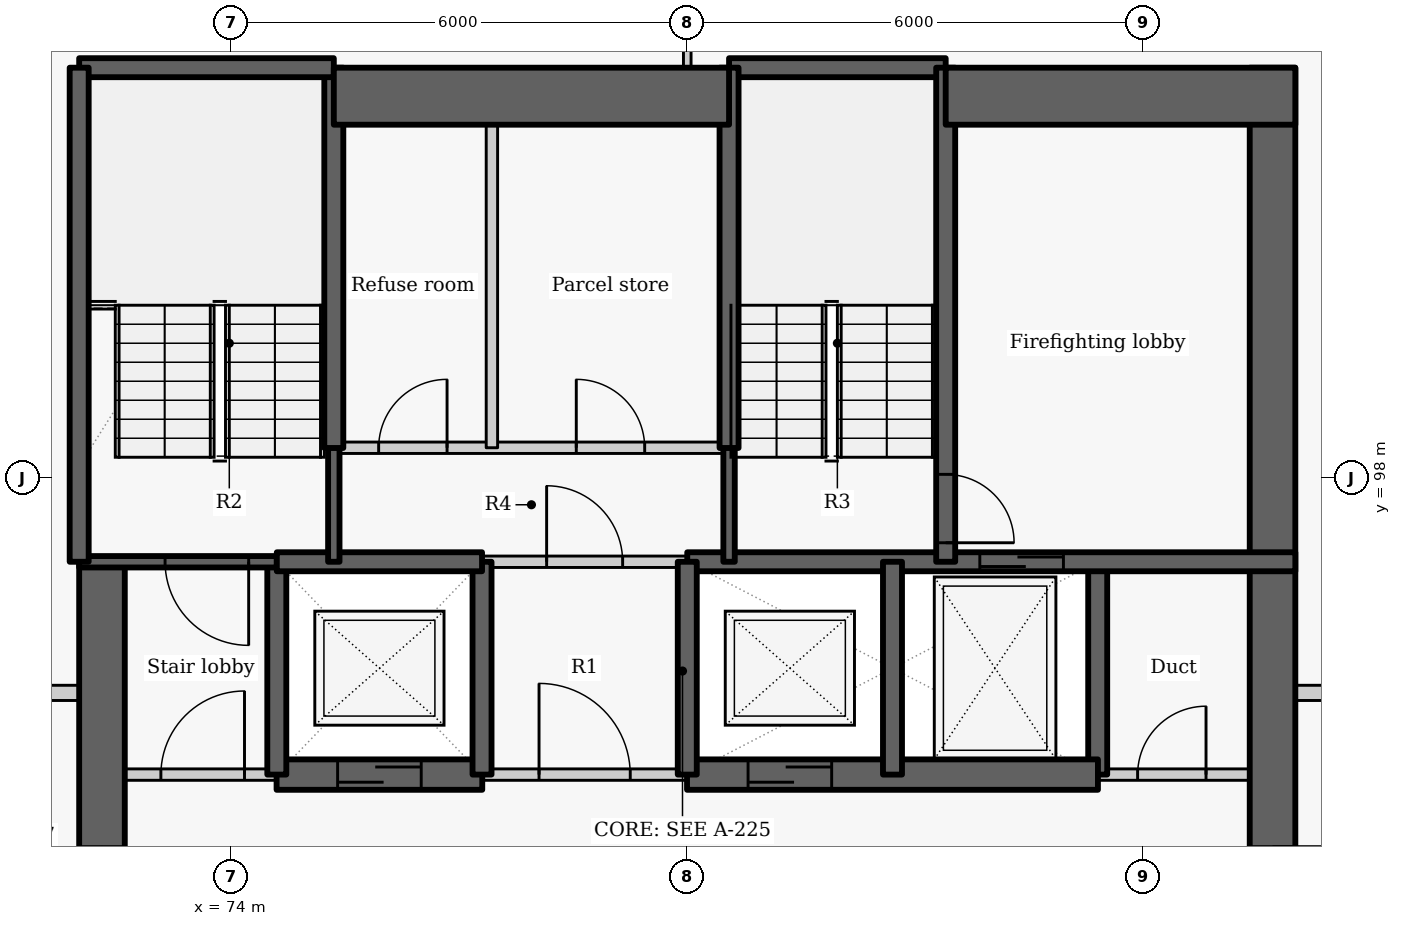
"""IFC4 building model, lengths in metres.
Left out: names, types, materials, properties, quantities, classifications, styles, units other than length and angle.
Written with IfcOpenShell. Run it as: python <this file> out.ifc"""

import sys

from ifc_helpers import new_model, si_unit, direction, frame, frame_2d, origin, place, context, subcontext, project, spatial, rectangle, extrude, element, fill, save


model = new_model("IFC4")
c1 = context("Model", 3, precision=1e-05, world=origin(), true_north=direction((0.0, 1.0)))
c2 = subcontext(c1, "Body", "Model", "MODEL_VIEW")
j1 = project(units=[si_unit("LENGTHUNIT", "METRE"), si_unit("PLANEANGLEUNIT", "RADIAN")], contexts=[c1])
p1 = place(None, origin())
s1 = spatial("IfcSite", under=j1, at=p1, CompositionType="ELEMENT")
p2 = place(p1, origin())
s2 = spatial("IfcBuilding", under=s1, at=p2, CompositionType="ELEMENT")
p3 = place(p2, frame((0.0, 0.0, 130.5)))
s3 = spatial("IfcBuildingStorey", under=s2, at=p3, CompositionType="ELEMENT", Elevation=130.5)
p4 = place(p3, frame((72.3, 87.8, -0.275), z_axis=(0.0, 0.0, 1.0), x_axis=(0.0, 1.0, 0.0)))
e1 = element("IfcWall", 1, at=p4, inside=s3, PredefinedType="SHEAR", context=c2, shape_type="SweptSolid", body=[
    extrude(rectangle(XDim=9.1, YDim=0.6, at=frame_2d((4.55, 0.0))), origin(), (0.0, 0.0, 1.0), 3.3),
])
p5 = place(p4, frame((3.852, 0.0, 0.275)))
e2 = element("IfcOpeningElement", 2, at=p5, cuts=e1, PredefinedType="OPENING", context=c2, shape_type="SweptSolid", body=[
    extrude(rectangle(XDim=1.5, YDim=2.1, at=frame_2d((0.75, 1.05))), frame((0.0, 0.31, 0.0), z_axis=(0.0, -1.0, 0.0), x_axis=(1.0, 0.0, 0.0)), (0.0, 0.0, 1.0), 0.62),
])
p6 = place(p3, frame((85.4, 94.1, -0.275), z_axis=(0.0, 0.0, 1.0), x_axis=(0.0, 1.0, 0.0)))
e3 = element("IfcWall", 3, at=p6, inside=s3, PredefinedType="SHEAR", context=c2, shape_type="SweptSolid", body=[
    extrude(rectangle(XDim=2.8, YDim=0.25, at=frame_2d((1.4, 0.0))), origin(), (0.0, 0.0, 1.0), 3.3),
])
p7 = place(p3, frame((87.7, 103.4, -0.275), z_axis=(0.0, 0.0, 1.0), x_axis=(0.0, -1.0, 0.0)))
e4 = element("IfcWall", 4, at=p7, inside=s3, PredefinedType="SHEAR", context=c2, shape_type="SweptSolid", body=[
    extrude(rectangle(XDim=15.6, YDim=0.6, at=frame_2d((7.8, 0.0))), origin(), (0.0, 0.0, 1.0), 3.3),
])
p8 = place(p7, frame((10.248, 0.0, 0.275)))
e5 = element("IfcOpeningElement", 5, at=p8, cuts=e4, PredefinedType="OPENING", context=c2, shape_type="SweptSolid", body=[
    extrude(rectangle(XDim=1.5, YDim=2.1, at=frame_2d((0.75, 1.05))), frame((0.0, 0.31, 0.0), z_axis=(0.0, -1.0, 0.0), x_axis=(1.0, 0.0, 0.0)), (0.0, 0.0, 1.0), 0.62),
])
p9 = place(p3, frame((72.0, 94.1, 0.0), z_axis=(0.0, 0.0, 1.0), x_axis=(1.0, 0.0, 0.0)))
e6 = element("IfcWall", 6, at=p9, inside=s3, PredefinedType="PARTITIONING", context=c2, shape_type="SweptSolid", body=[
    extrude(rectangle(XDim=2.603, YDim=0.15, at=frame_2d((1.302, 0.0))), origin(), (0.0, 0.0, 1.0), 3.025),
])
p10 = place(p9, frame((1.075, 0.0, 0.0)))
e7 = element("IfcOpeningElement", 7, at=p10, cuts=e6, PredefinedType="OPENING", context=c2, shape_type="SweptSolid", body=[
    extrude(rectangle(XDim=1.1, YDim=2.1, at=frame_2d((0.55, 1.05))), frame((0.0, 0.085, 0.0), z_axis=(0.0, -1.0, 0.0), x_axis=(1.0, 0.0, 0.0)), (0.0, 0.0, 1.0), 0.17),
])
p11 = place(p3, frame((77.297, 94.1, 0.0), z_axis=(0.0, 0.0, 1.0), x_axis=(1.0, 0.0, 0.0)))
e8 = element("IfcWall", 8, at=p11, inside=s3, PredefinedType="PARTITIONING", context=c2, shape_type="SweptSolid", body=[
    extrude(rectangle(XDim=2.706, YDim=0.15, at=frame_2d((1.353, 0.0))), origin(), (0.0, 0.0, 1.0), 3.025),
])
p12 = place(p11, frame((0.753, 0.0, 0.0)))
e9 = element("IfcOpeningElement", 9, at=p12, cuts=e8, PredefinedType="OPENING", context=c2, shape_type="SweptSolid", body=[
    extrude(rectangle(XDim=1.2, YDim=2.1, at=frame_2d((0.6, 1.05))), frame((0.0, 0.085, 0.0), z_axis=(0.0, -1.0, 0.0), x_axis=(1.0, 0.0, 0.0)), (0.0, 0.0, 1.0), 0.17),
])
p13 = place(p3, frame((85.397, 94.1, 0.0), z_axis=(0.0, 0.0, 1.0), x_axis=(1.0, 0.0, 0.0)))
e10 = element("IfcWall", 10, at=p13, inside=s3, PredefinedType="PARTITIONING", context=c2, shape_type="SweptSolid", body=[
    extrude(rectangle(XDim=2.603, YDim=0.15, at=frame_2d((1.302, 0.0))), origin(), (0.0, 0.0, 1.0), 3.025),
])
p14 = place(p13, frame((0.528, 0.0, 0.0)))
e11 = element("IfcOpeningElement", 11, at=p14, cuts=e10, PredefinedType="OPENING", context=c2, shape_type="SweptSolid", body=[
    extrude(rectangle(XDim=0.9, YDim=2.1, at=frame_2d((0.45, 1.05))), frame((0.0, 0.085, 0.0), z_axis=(0.0, -1.0, 0.0), x_axis=(1.0, 0.0, 0.0)), (0.0, 0.0, 1.0), 0.17),
])
p15 = place(p3, frame((74.597, 94.1, -0.275), z_axis=(0.0, 0.0, 1.0), x_axis=(1.0, 0.0, 0.0)))
e12 = element("IfcWall", 12, at=p15, inside=s3, PredefinedType="SHEAR", context=c2, shape_type="SweptSolid", body=[
    extrude(rectangle(XDim=2.706, YDim=0.4, at=frame_2d((1.353, 0.0))), origin(), (0.0, 0.0, 1.0), 3.3),
])
p16 = place(p15, frame((0.803, 0.0, 0.275)))
e13 = element("IfcOpeningElement", 13, at=p16, cuts=e12, PredefinedType="OPENING", context=c2, shape_type="SweptSolid", body=[
    extrude(rectangle(XDim=1.1, YDim=2.1, at=frame_2d((0.55, 1.05))), frame((0.0, 0.21, 0.0), z_axis=(0.0, -1.0, 0.0), x_axis=(1.0, 0.0, 0.0)), (0.0, 0.0, 1.0), 0.42),
])
p17 = place(p3, frame((79.997, 94.1, -0.275), z_axis=(0.0, 0.0, 1.0), x_axis=(1.0, 0.0, 0.0)))
e14 = element("IfcWall", 14, at=p17, inside=s3, PredefinedType="SHEAR", context=c2, shape_type="SweptSolid", body=[
    extrude(rectangle(XDim=5.406, YDim=0.4, at=frame_2d((2.703, 0.0))), origin(), (0.0, 0.0, 1.0), 3.3),
])
p18 = place(p17, frame((0.803, 0.0, 0.275)))
e15 = element("IfcOpeningElement", 15, at=p18, cuts=e14, PredefinedType="OPENING", context=c2, shape_type="SweptSolid", body=[
    extrude(rectangle(XDim=1.1, YDim=2.1, at=frame_2d((0.55, 1.05))), frame((0.0, 0.21, 0.0), z_axis=(0.0, -1.0, 0.0), x_axis=(1.0, 0.0, 0.0)), (0.0, 0.0, 1.0), 0.42),
])
p19 = place(p3, frame((74.6, 94.1, -0.275), z_axis=(0.0, 0.0, 1.0), x_axis=(0.0, 1.0, 0.0)))
e16 = element("IfcWall", 16, at=p19, inside=s3, PredefinedType="SHEAR", context=c2, shape_type="SweptSolid", body=[
    extrude(rectangle(XDim=2.8, YDim=0.25, at=frame_2d((1.4, 0.0))), origin(), (0.0, 0.0, 1.0), 3.3),
])
p20 = place(p3, frame((74.6, 96.9, -0.275), z_axis=(0.0, 0.0, 1.0), x_axis=(-1.0, 0.0, 0.0)))
e17 = element("IfcWall", 17, at=p20, inside=s3, PredefinedType="SHEAR", context=c2, shape_type="SweptSolid", body=[
    extrude(rectangle(XDim=2.6, YDim=0.15, at=frame_2d((1.3, 0.0))), origin(), (0.0, 0.0, 1.0), 3.3),
])
p21 = place(p20, frame((0.37, 0.0, 0.275)))
e18 = element("IfcOpeningElement", 18, at=p21, cuts=e17, PredefinedType="OPENING", context=c2, shape_type="SweptSolid", body=[
    extrude(rectangle(XDim=1.1, YDim=2.1, at=frame_2d((0.55, 1.05))), frame((0.0, 0.085, 0.0), z_axis=(0.0, -1.0, 0.0), x_axis=(1.0, 0.0, 0.0)), (0.0, 0.0, 1.0), 0.17),
])
p22 = place(p3, frame((77.3, 94.1, -0.275), z_axis=(0.0, 0.0, 1.0), x_axis=(0.0, 1.0, 0.0)))
e19 = element("IfcWall", 19, at=p22, inside=s3, PredefinedType="SHEAR", context=c2, shape_type="SweptSolid", body=[
    extrude(rectangle(XDim=2.8, YDim=0.25, at=frame_2d((1.4, 0.0))), origin(), (0.0, 0.0, 1.0), 3.3),
])
p23 = place(p3, frame((74.6, 96.9, -0.275), z_axis=(0.0, 0.0, 1.0), x_axis=(1.0, 0.0, 0.0)))
e20 = element("IfcWall", 20, at=p23, inside=s3, PredefinedType="SHEAR", context=c2, shape_type="SweptSolid", body=[
    extrude(rectangle(XDim=2.7, YDim=0.25, at=frame_2d((1.35, 0.0))), origin(), (0.0, 0.0, 1.0), 3.3),
])
p24 = place(p3, frame((80.0, 96.9, -0.275), z_axis=(0.0, 0.0, 1.0), x_axis=(1.0, 0.0, 0.0)))
e21 = element("IfcWall", 21, at=p24, inside=s3, PredefinedType="SHEAR", context=c2, shape_type="SweptSolid", body=[
    extrude(rectangle(XDim=8.0, YDim=0.25, at=frame_2d((4.0, 0.0))), origin(), (0.0, 0.0, 1.0), 3.3),
])
p25 = place(p24, frame((3.849, 0.0, 0.275)))
e22 = element("IfcOpeningElement", 22, at=p25, cuts=e21, PredefinedType="OPENING", context=c2, shape_type="SweptSolid", body=[
    extrude(rectangle(XDim=1.1, YDim=2.1, at=frame_2d((0.55, 1.05))), frame((0.0, 0.135, 0.0), z_axis=(0.0, -1.0, 0.0), x_axis=(1.0, 0.0, 0.0)), (0.0, 0.0, 1.0), 0.27),
])
p26 = place(p3, frame((80.0, 94.1, -0.275), z_axis=(0.0, 0.0, 1.0), x_axis=(0.0, 1.0, 0.0)))
e23 = element("IfcWall", 23, at=p26, inside=s3, PredefinedType="SHEAR", context=c2, shape_type="SweptSolid", body=[
    extrude(rectangle(XDim=2.8, YDim=0.25, at=frame_2d((1.4, 0.0))), origin(), (0.0, 0.0, 1.0), 3.3),
])
p27 = place(p3, frame((77.3, 96.9, 0.0), z_axis=(0.0, 0.0, 1.0), x_axis=(1.0, 0.0, 0.0)))
e24 = element("IfcWall", 24, at=p27, inside=s3, PredefinedType="PARTITIONING", context=c2, shape_type="SweptSolid", body=[
    extrude(rectangle(XDim=2.7, YDim=0.15, at=frame_2d((1.35, 0.0))), origin(), (0.0, 0.0, 1.0), 3.025),
])
p28 = place(p27, frame((0.85, 0.0, 0.0)))
e25 = element("IfcOpeningElement", 25, at=p28, cuts=e24, PredefinedType="OPENING", context=c2, shape_type="SweptSolid", body=[
    extrude(rectangle(XDim=1.0, YDim=2.1, at=frame_2d((0.5, 1.05))), frame((0.0, 0.085, 0.0), z_axis=(0.0, -1.0, 0.0), x_axis=(1.0, 0.0, 0.0)), (0.0, 0.0, 1.0), 0.17),
])
p29 = place(p3, frame((82.7, 94.1, -0.275), z_axis=(0.0, 0.0, 1.0), x_axis=(0.0, 1.0, 0.0)))
e26 = element("IfcWall", 26, at=p29, inside=s3, PredefinedType="SHEAR", context=c2, shape_type="SweptSolid", body=[
    extrude(rectangle(XDim=2.8, YDim=0.25, at=frame_2d((1.4, 0.0))), origin(), (0.0, 0.0, 1.0), 3.3),
])
p30 = place(p3, frame((75.35, 96.9, -0.275), z_axis=(0.0, 0.0, 1.0), x_axis=(0.0, 1.0, 0.0)))
e27 = element("IfcWall", 27, at=p30, inside=s3, PredefinedType="SHEAR", context=c2, shape_type="SweptSolid", body=[
    extrude(rectangle(XDim=1.503, YDim=0.15, at=frame_2d((0.751, 0.0))), origin(), (0.0, 0.0, 1.0), 3.3),
])
p31 = place(p3, frame((75.35, 98.397, -0.275), z_axis=(0.0, 0.0, 1.0), x_axis=(0.0, 1.0, 0.0)))
e28 = element("IfcWall", 28, at=p31, inside=s3, PredefinedType="SHEAR", context=c2, shape_type="SweptSolid", body=[
    extrude(rectangle(XDim=5.003, YDim=0.25, at=frame_2d((2.501, 0.0))), origin(), (0.0, 0.0, 1.0), 3.3),
])
p32 = place(p3, frame((72.0, 103.4, -0.275), z_axis=(0.0, 0.0, 1.0), x_axis=(1.0, 0.0, 0.0)))
e29 = element("IfcWall", 29, at=p32, inside=s3, PredefinedType="SHEAR", context=c2, shape_type="SweptSolid", body=[
    extrude(rectangle(XDim=3.35, YDim=0.25, at=frame_2d((1.675, 0.0))), origin(), (0.0, 0.0, 1.0), 3.3),
])
p33 = place(p3, frame((80.55, 103.4, -0.275), z_axis=(0.0, 0.0, 1.0), x_axis=(1.0, 0.0, 0.0)))
e30 = element("IfcWall", 30, at=p33, inside=s3, PredefinedType="SHEAR", context=c2, shape_type="SweptSolid", body=[
    extrude(rectangle(XDim=2.85, YDim=0.25, at=frame_2d((1.425, 0.0))), origin(), (0.0, 0.0, 1.0), 3.3),
])
p34 = place(p3, frame((72.0, 96.9, -0.275), z_axis=(0.0, 0.0, 1.0), x_axis=(0.0, 1.0, 0.0)))
e31 = element("IfcWall", 31, at=p34, inside=s3, PredefinedType="SHEAR", context=c2, shape_type="SweptSolid", body=[
    extrude(rectangle(XDim=6.5, YDim=0.25, at=frame_2d((3.25, 0.0))), origin(), (0.0, 0.0, 1.0), 3.3),
])
p35 = place(p3, frame((83.4, 103.4, -0.275), z_axis=(0.0, 0.0, 1.0), x_axis=(0.0, -1.0, 0.0)))
e32 = element("IfcWall", 32, at=p35, inside=s3, PredefinedType="SHEAR", context=c2, shape_type="SweptSolid", body=[
    extrude(rectangle(XDim=6.5, YDim=0.25, at=frame_2d((3.25, 0.0))), origin(), (0.0, 0.0, 1.0), 3.3),
])
p36 = place(p35, frame((5.35, 0.0, 0.275)))
e33 = element("IfcOpeningElement", 33, at=p36, cuts=e32, PredefinedType="OPENING", context=c2, shape_type="SweptSolid", body=[
    extrude(rectangle(XDim=0.9, YDim=2.1, at=frame_2d((0.45, 1.05))), frame((0.0, 0.135, 0.0), z_axis=(0.0, -1.0, 0.0), x_axis=(1.0, 0.0, 0.0)), (0.0, 0.0, 1.0), 0.27),
])
p37 = place(p3, frame((80.55, 96.9, -0.275), z_axis=(0.0, 0.0, 1.0), x_axis=(0.0, 1.0, 0.0)))
e34 = element("IfcWall", 34, at=p37, inside=s3, PredefinedType="SHEAR", context=c2, shape_type="SweptSolid", body=[
    extrude(rectangle(XDim=1.503, YDim=0.15, at=frame_2d((0.751, 0.0))), origin(), (0.0, 0.0, 1.0), 3.3),
])
p38 = place(p3, frame((80.55, 98.397, -0.275), z_axis=(0.0, 0.0, 1.0), x_axis=(0.0, 1.0, 0.0)))
e35 = element("IfcWall", 35, at=p38, inside=s3, PredefinedType="SHEAR", context=c2, shape_type="SweptSolid", body=[
    extrude(rectangle(XDim=5.003, YDim=0.25, at=frame_2d((2.501, 0.0))), origin(), (0.0, 0.0, 1.0), 3.3),
])
p39 = place(p3, frame((75.35, 103.025, -0.275), z_axis=(0.0, 0.0, 1.0), x_axis=(1.0, 0.0, 0.0)))
e36 = element("IfcWall", 36, at=p39, inside=s3, PredefinedType="SHEAR", context=c2, shape_type="SweptSolid", body=[
    extrude(rectangle(XDim=5.2, YDim=0.75, at=frame_2d((2.6, 0.0))), origin(), (0.0, 0.0, 1.0), 3.3),
])
p40 = place(p3, frame((83.4, 103.025, -0.275), z_axis=(0.0, 0.0, 1.0), x_axis=(1.0, 0.0, 0.0)))
e37 = element("IfcWall", 37, at=p40, inside=s3, PredefinedType="SHEAR", context=c2, shape_type="SweptSolid", body=[
    extrude(rectangle(XDim=4.6, YDim=0.75, at=frame_2d((2.3, 0.0))), origin(), (0.0, 0.0, 1.0), 3.3),
])
p41 = place(p3, frame((75.35, 98.4, 0.0), z_axis=(0.0, 0.0, 1.0), x_axis=(1.0, 0.0, 0.0)))
e38 = element("IfcWall", 38, at=p41, inside=s3, PredefinedType="PARTITIONING", context=c2, shape_type="SweptSolid", body=[
    extrude(rectangle(XDim=5.2, YDim=0.15, at=frame_2d((2.6, 0.0))), origin(), (0.0, 0.0, 1.0), 3.025),
])
p42 = place(p41, frame((0.59, 0.0, 0.0)))
e39 = element("IfcOpeningElement", 39, at=p42, cuts=e38, PredefinedType="OPENING", context=c2, shape_type="SweptSolid", body=[
    extrude(rectangle(XDim=0.9, YDim=2.1, at=frame_2d((0.45, 1.05))), frame((0.0, 0.085, 0.0), z_axis=(0.0, -1.0, 0.0), x_axis=(1.0, 0.0, 0.0)), (0.0, 0.0, 1.0), 0.17),
])
p43 = place(p41, frame((3.19, 0.0, 0.0)))
e40 = element("IfcOpeningElement", 40, at=p43, cuts=e38, PredefinedType="OPENING", context=c2, shape_type="SweptSolid", body=[
    extrude(rectangle(XDim=0.9, YDim=2.1, at=frame_2d((0.45, 1.05))), frame((0.0, 0.085, 0.0), z_axis=(0.0, -1.0, 0.0), x_axis=(1.0, 0.0, 0.0)), (0.0, 0.0, 1.0), 0.17),
])
p44 = place(p3, frame((77.43, 98.4, 0.0), z_axis=(0.0, 0.0, 1.0), x_axis=(0.0, 1.0, 0.0)))
e41 = element("IfcWall", 41, at=p44, inside=s3, PredefinedType="PARTITIONING", context=c2, shape_type="SweptSolid", body=[
    extrude(rectangle(XDim=5.0, YDim=0.15, at=frame_2d((2.5, 0.0))), origin(), (0.0, 0.0, 1.0), 3.025),
])
p45 = place(p3, frame((69.537, 95.175, 0.0), z_axis=(0.0, 0.0, 1.0), x_axis=(1.0, 0.0, 0.0)))
e42 = element("IfcWall", 42, at=p45, inside=s3, PredefinedType="PARTITIONING", context=c2, shape_type="SweptSolid", body=[
    extrude(rectangle(XDim=2.463, YDim=0.2, at=frame_2d((1.231, 0.0))), origin(), (0.0, 0.0, 1.0), 2.505),
])
p46 = place(p3, frame((88.0, 95.175, 0.0), z_axis=(0.0, 0.0, 1.0), x_axis=(1.0, 0.0, 0.0)))
e43 = element("IfcWall", 43, at=p46, inside=s3, PredefinedType="PARTITIONING", context=c2, shape_type="SweptSolid", body=[
    extrude(rectangle(XDim=1.423, YDim=0.2, at=frame_2d((0.711, 0.0))), origin(), (0.0, 0.0, 1.0), 3.025),
])
p47 = place(p3, frame((80.0, 103.4, 0.0), z_axis=(0.0, 0.0, 1.0), x_axis=(0.0, 1.0, 0.0)))
e44 = element("IfcWall", 44, at=p47, inside=s3, PredefinedType="PARTITIONING", context=c2, shape_type="SweptSolid", body=[
    extrude(rectangle(XDim=0.3, YDim=0.1, at=frame_2d((0.15, 0.0))), origin(), (0.0, 0.0, 1.0), 3.025),
])
p48 = place(p10, origin())
e45 = element("IfcDoor", 45, at=p48, inside=s3, OperationType="SINGLE_SWING_RIGHT", PredefinedType="DOOR", context=c2, shape_type="SweptSolid", body=[
    extrude(rectangle(XDim=1.1, YDim=2.1, at=frame_2d((0.55, 1.05))), frame((0.0, 0.025, 0.0), z_axis=(0.0, -1.0, 0.0), x_axis=(1.0, 0.0, 0.0)), (0.0, 0.0, 1.0), 0.05),
])
fill(e7, e45)
p49 = place(p16, origin())
e46 = element("IfcDoor", 46, at=p49, inside=s3, OperationType="SLIDING_TO_LEFT", PredefinedType="DOOR", context=c2, shape_type="SweptSolid", body=[
    extrude(rectangle(XDim=1.1, YDim=2.1, at=frame_2d((0.55, 1.05))), frame((0.0, 0.025, 0.0), z_axis=(0.0, -1.0, 0.0), x_axis=(1.0, 0.0, 0.0)), (0.0, 0.0, 1.0), 0.05),
])
fill(e13, e46)
p50 = place(p12, origin())
e47 = element("IfcDoor", 47, at=p50, inside=s3, OperationType="DOUBLE_DOOR_SINGLE_SWING", PredefinedType="DOOR", context=c2, shape_type="SweptSolid", body=[
    extrude(rectangle(XDim=1.2, YDim=2.1, at=frame_2d((0.6, 1.05))), frame((0.0, 0.025, 0.0), z_axis=(0.0, -1.0, 0.0), x_axis=(1.0, 0.0, 0.0)), (0.0, 0.0, 1.0), 0.05),
])
fill(e9, e47)
p51 = place(p18, origin())
e48 = element("IfcDoor", 48, at=p51, inside=s3, OperationType="SLIDING_TO_LEFT", PredefinedType="DOOR", context=c2, shape_type="SweptSolid", body=[
    extrude(rectangle(XDim=1.1, YDim=2.1, at=frame_2d((0.55, 1.05))), frame((0.0, 0.025, 0.0), z_axis=(0.0, -1.0, 0.0), x_axis=(1.0, 0.0, 0.0)), (0.0, 0.0, 1.0), 0.05),
])
fill(e15, e48)
p52 = place(p25, origin())
e49 = element("IfcDoor", 49, at=p52, inside=s3, OperationType="SLIDING_TO_LEFT", PredefinedType="DOOR", context=c2, shape_type="SweptSolid", body=[
    extrude(rectangle(XDim=1.1, YDim=2.1, at=frame_2d((0.55, 1.05))), frame((0.0, 0.025, 0.0), z_axis=(0.0, -1.0, 0.0), x_axis=(1.0, 0.0, 0.0)), (0.0, 0.0, 1.0), 0.05),
])
fill(e22, e49)
p53 = place(p14, origin())
e50 = element("IfcDoor", 50, at=p53, inside=s3, OperationType="SINGLE_SWING_RIGHT", PredefinedType="DOOR", context=c2, shape_type="SweptSolid", body=[
    extrude(rectangle(XDim=0.9, YDim=2.1, at=frame_2d((0.45, 1.05))), frame((0.0, 0.025, 0.0), z_axis=(0.0, -1.0, 0.0), x_axis=(1.0, 0.0, 0.0)), (0.0, 0.0, 1.0), 0.05),
])
fill(e11, e50)
p54 = place(p28, origin())
e51 = element("IfcDoor", 51, at=p54, inside=s3, OperationType="SINGLE_SWING_LEFT", PredefinedType="DOOR", context=c2, shape_type="SweptSolid", body=[
    extrude(rectangle(XDim=1.0, YDim=2.1, at=frame_2d((0.5, 1.05))), frame((0.0, 0.025, 0.0), z_axis=(0.0, -1.0, 0.0), x_axis=(1.0, 0.0, 0.0)), (0.0, 0.0, 1.0), 0.05),
])
fill(e25, e51)
p55 = place(p42, origin())
e52 = element("IfcDoor", 52, at=p55, inside=s3, OperationType="SINGLE_SWING_RIGHT", PredefinedType="DOOR", context=c2, shape_type="SweptSolid", body=[
    extrude(rectangle(XDim=0.9, YDim=2.1, at=frame_2d((0.45, 1.05))), frame((0.0, 0.025, 0.0), z_axis=(0.0, -1.0, 0.0), x_axis=(1.0, 0.0, 0.0)), (0.0, 0.0, 1.0), 0.05),
])
fill(e39, e52)
p56 = place(p43, origin())
e53 = element("IfcDoor", 53, at=p56, inside=s3, OperationType="SINGLE_SWING_LEFT", PredefinedType="DOOR", context=c2, shape_type="SweptSolid", body=[
    extrude(rectangle(XDim=0.9, YDim=2.1, at=frame_2d((0.45, 1.05))), frame((0.0, 0.025, 0.0), z_axis=(0.0, -1.0, 0.0), x_axis=(1.0, 0.0, 0.0)), (0.0, 0.0, 1.0), 0.05),
])
fill(e40, e53)
p57 = place(p21, origin())
e54 = element("IfcDoor", 54, at=p57, inside=s3, OperationType="SINGLE_SWING_LEFT", PredefinedType="DOOR", context=c2, shape_type="SweptSolid", body=[
    extrude(rectangle(XDim=1.1, YDim=2.1, at=frame_2d((0.55, 1.05))), frame((0.0, 0.025, 0.0), z_axis=(0.0, -1.0, 0.0), x_axis=(1.0, 0.0, 0.0)), (0.0, 0.0, 1.0), 0.05),
])
fill(e18, e54)
p58 = place(p36, origin())
e55 = element("IfcDoor", 55, at=p58, inside=s3, OperationType="SINGLE_SWING_RIGHT", PredefinedType="DOOR", context=c2, shape_type="SweptSolid", body=[
    extrude(rectangle(XDim=0.9, YDim=2.1, at=frame_2d((0.45, 1.05))), frame((0.0, 0.025, 0.0), z_axis=(0.0, -1.0, 0.0), x_axis=(1.0, 0.0, 0.0)), (0.0, 0.0, 1.0), 0.05),
])
fill(e33, e55)
p59 = place(p8, origin())
e56 = element("IfcDoor", 56, at=p59, inside=s3, OperationType="DOUBLE_DOOR_SINGLE_SWING", PredefinedType="DOOR", context=c2, shape_type="SweptSolid", body=[
    extrude(rectangle(XDim=1.5, YDim=2.1, at=frame_2d((0.75, 1.05))), frame((0.0, 0.025, 0.0), z_axis=(0.0, -1.0, 0.0), x_axis=(1.0, 0.0, 0.0)), (0.0, 0.0, 1.0), 0.05),
])
fill(e5, e56)
p60 = place(p5, origin())
e57 = element("IfcDoor", 57, at=p60, inside=s3, OperationType="DOUBLE_DOOR_SINGLE_SWING", PredefinedType="DOOR", context=c2, shape_type="SweptSolid", body=[
    extrude(rectangle(XDim=1.5, YDim=2.1, at=frame_2d((0.75, 1.05))), frame((0.0, 0.025, 0.0), z_axis=(0.0, -1.0, 0.0), x_axis=(1.0, 0.0, 0.0)), (0.0, 0.0, 1.0), 0.05),
])
fill(e2, e57)
save(model, sys.argv[1])
